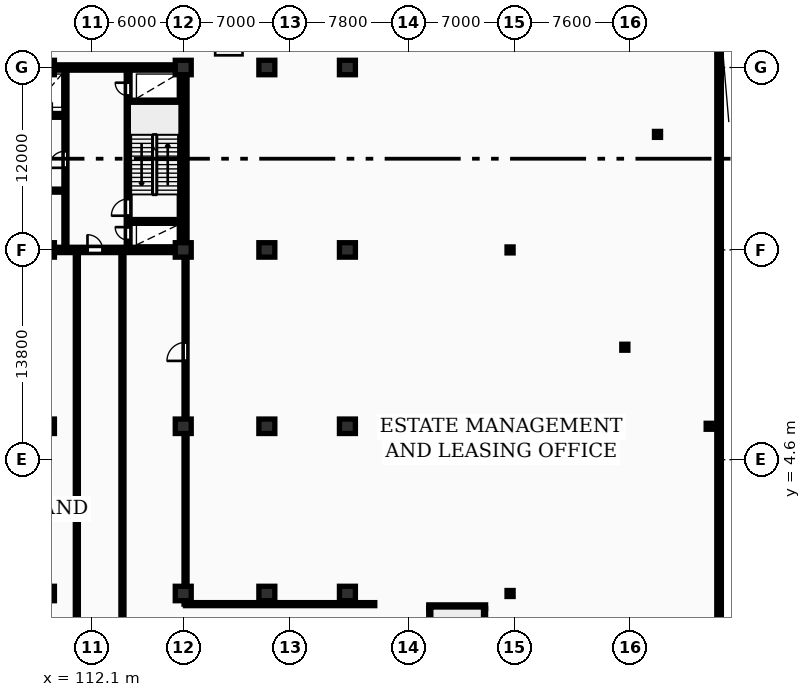
"""IFC4 building model, lengths in metres.
Left out: names, types, materials, properties, quantities, classifications, styles, units other than length and angle.
Written with IfcOpenShell. Run it as: python <this file> out.ifc"""

import sys

from ifc_helpers import new_model, si_unit, direction, frame, frame_2d, origin, origin_2d, place, context, subcontext, project, spatial, rectangle, i_section, extrude, element, fill, save


model = new_model("IFC4")
c1 = context("Model", 3, precision=1e-05, world=origin(), true_north=direction((0.0, 1.0)))
c2 = subcontext(c1, "Body", "Model", "MODEL_VIEW")
j1 = project(units=[si_unit("LENGTHUNIT", "METRE"), si_unit("PLANEANGLEUNIT", "RADIAN")], contexts=[c1])
p1 = place(None, origin())
s1 = spatial("IfcSite", under=j1, at=p1, CompositionType="ELEMENT")
p2 = place(p1, origin())
s2 = spatial("IfcBuilding", under=s1, at=p2, CompositionType="ELEMENT")
p3 = place(p2, origin())
s3 = spatial("IfcBuildingStorey", under=s2, at=p3, CompositionType="ELEMENT", Elevation=0.0)
for number, where, z_axis, x_axis in (
    (1, (109.1, -4.2, 0.0), (0.0, 0.0, 1.0), (1.0, 0.0, 0.0)),
    (2, (109.1, 6.8, 0.0), (0.0, 0.0, 1.0), (1.0, 0.0, 0.0)),
    (3, (109.1, 18.4, 0.0), (0.0, 0.0, 1.0), (1.0, 0.0, 0.0)),
    (4, (109.1, 30.4, 0.0), (0.0, 0.0, 1.0), (1.0, 0.0, 0.0)),
    (5, (118.1, -4.2, 0.0), (0.0, 0.0, 1.0), (1.0, 0.0, 0.0)),
    (6, (118.1, 6.8, 0.0), (0.0, 0.0, 1.0), (1.0, 0.0, 0.0)),
    (7, (118.1, 18.4, 0.0), (0.0, 0.0, 1.0), (1.0, 0.0, 0.0)),
    (8, (118.1, 30.4, 0.0), (0.0, 0.0, 1.0), (1.0, 0.0, 0.0)),
    (9, (123.6, -4.2, 0.0), (0.0, 0.0, 1.0), (1.0, 0.0, 0.0)),
    (10, (123.6, 6.8, 0.0), (0.0, 0.0, 1.0), (1.0, 0.0, 0.0)),
    (11, (123.6, 18.4, 0.0), (0.0, 0.0, 1.0), (1.0, 0.0, 0.0)),
    (12, (123.6, 30.4, 0.0), (0.0, 0.0, 1.0), (1.0, 0.0, 0.0)),
    (13, (128.9, -4.2, 0.0), (0.0, 0.0, 1.0), (1.0, 0.0, 0.0)),
    (14, (128.9, 6.8, 0.0), (0.0, 0.0, 1.0), (1.0, 0.0, 0.0)),
    (15, (128.9, 18.4, 0.0), (0.0, 0.0, 1.0), (1.0, 0.0, 0.0)),
    (16, (128.9, 30.4, 0.0), (0.0, 0.0, 1.0), (1.0, 0.0, 0.0)),
):
    element("IfcColumn", number, at=place(p3, frame(where, z_axis=z_axis, x_axis=x_axis)), inside=s3, PredefinedType="COLUMN", context=c2, shape_type="SweptSolid", body=[
        extrude(rectangle(XDim=1.05, YDim=0.95, at=origin_2d()), origin(), (0.0, 0.0, 1.0), 5.4),
    ])
for number, where, z_axis, x_axis in (
    (17, (139.6, -4.2, 0.0), (0.0, 0.0, 1.0), (1.0, 0.0, 0.0)),
    (18, (139.6, 18.4, 0.0), (0.0, 0.0, 1.0), (1.0, 0.0, 0.0)),
    (19, (149.3, 26.0, 0.0), (0.0, 0.0, 1.0), (1.0, 0.0, 0.0)),
    (20, (147.15, 12.0, 0.0), (0.0, 0.0, 1.0), (1.0, 0.0, 0.0)),
    (21, (152.7, 6.8, 0.0), (0.0, 0.0, 1.0), (1.0, 0.0, 0.0)),
):
    element("IfcColumn", number, at=place(p3, frame(where, z_axis=z_axis, x_axis=x_axis)), inside=s3, PredefinedType="COLUMN", context=c2, shape_type="SweptSolid", body=[
        extrude(i_section(OverallWidth=0.399, OverallDepth=0.394, WebThickness=0.023, FlangeThickness=0.037, FilletRadius=0.015, at=origin_2d()), origin(), (0.0, 0.0, 1.0), 5.4),
    ])
p4 = place(p3, frame((153.35, -26.5, 0.0), z_axis=(0.0, 0.0, 1.0), x_axis=(0.0, 1.0, 0.0)))
e22 = element("IfcWall", 22, at=p4, inside=s3, PredefinedType="STANDARD", context=c2, shape_type="SweptSolid", body=[
    extrude(rectangle(XDim=135.7, YDim=0.3, at=frame_2d((67.85, 0.0))), origin(), (0.0, 0.0, 1.0), 5.1),
])
p5 = place(p4, frame((60.8, 0.0, 0.0)))
e23 = element("IfcOpeningElement", 23, at=p5, cuts=e22, PredefinedType="OPENING", context=c2, shape_type="SweptSolid", body=[
    extrude(rectangle(XDim=7.2, YDim=3.2, at=frame_2d((3.6, 1.6))), frame((0.0, 0.16, 0.0), z_axis=(0.0, -1.0, 0.0), x_axis=(1.0, 0.0, 0.0)), (0.0, 0.0, 1.0), 0.32),
])
p6 = place(p4, frame((70.1, 0.0, 0.0)))
e24 = element("IfcOpeningElement", 24, at=p6, cuts=e22, PredefinedType="OPENING", context=c2, shape_type="SweptSolid", body=[
    extrude(rectangle(XDim=1.8, YDim=2.2, at=frame_2d((0.9, 1.1))), frame((0.0, 0.16, 0.0), z_axis=(0.0, -1.0, 0.0), x_axis=(1.0, 0.0, 0.0)), (0.0, 0.0, 1.0), 0.32),
])
p7 = place(p4, frame((77.5, 0.0, 0.0)))
e25 = element("IfcOpeningElement", 25, at=p7, cuts=e22, PredefinedType="OPENING", context=c2, shape_type="SweptSolid", body=[
    extrude(rectangle(XDim=4.2, YDim=3.6, at=frame_2d((2.1, 1.8))), frame((0.0, 0.16, 0.0), z_axis=(0.0, -1.0, 0.0), x_axis=(1.0, 0.0, 0.0)), (0.0, 0.0, 1.0), 0.32),
])
p8 = place(p4, frame((11.0, 0.0, 0.0)))
e26 = element("IfcOpeningElement", 26, at=p8, cuts=e22, PredefinedType="OPENING", context=c2, shape_type="SweptSolid", body=[
    extrude(rectangle(XDim=1.8, YDim=2.2, at=frame_2d((0.9, 1.1))), frame((0.0, 0.16, 0.0), z_axis=(0.0, -1.0, 0.0), x_axis=(1.0, 0.0, 0.0)), (0.0, 0.0, 1.0), 0.32),
])
p9 = place(p4, frame((105.8, 0.0, 0.0)))
e27 = element("IfcOpeningElement", 27, at=p9, cuts=e22, PredefinedType="OPENING", context=c2, shape_type="SweptSolid", body=[
    extrude(rectangle(XDim=1.8, YDim=2.2, at=frame_2d((0.9, 1.1))), frame((0.0, 0.16, 0.0), z_axis=(0.0, -1.0, 0.0), x_axis=(1.0, 0.0, 0.0)), (0.0, 0.0, 1.0), 0.32),
])
p10 = place(p3, frame((81.925, 30.4, 0.0), z_axis=(0.0, 0.0, 1.0), x_axis=(1.0, 0.0, 0.0)))
e28 = element("IfcWall", 28, at=p10, inside=s3, PredefinedType="SHEAR", context=c2, shape_type="SweptSolid", body=[
    extrude(rectangle(XDim=36.265, YDim=0.35, at=frame_2d((18.132, 0.0))), origin(), (0.0, 0.0, 1.0), 5.4),
])
p11 = place(p3, frame((118.015, 18.575, 0.0), z_axis=(0.0, 0.0, 1.0), x_axis=(0.0, 1.0, 0.0)))
e29 = element("IfcWall", 29, at=p11, inside=s3, PredefinedType="SHEAR", context=c2, shape_type="SweptSolid", body=[
    extrude(rectangle(XDim=11.65, YDim=0.35, at=frame_2d((5.825, 0.0))), origin(), (0.0, 0.0, 1.0), 5.4),
])
p12 = place(p3, frame((81.925, 18.4, 0.0), z_axis=(0.0, 0.0, 1.0), x_axis=(1.0, 0.0, 0.0)))
e30 = element("IfcWall", 30, at=p12, inside=s3, PredefinedType="SHEAR", context=c2, shape_type="SweptSolid", body=[
    extrude(rectangle(XDim=36.265, YDim=0.35, at=frame_2d((18.132, 0.0))), origin(), (0.0, 0.0, 1.0), 5.4),
])
p13 = place(p12, frame((5.675, 0.0, 0.0)))
e31 = element("IfcOpeningElement", 31, at=p13, cuts=e30, PredefinedType="OPENING", context=c2, shape_type="SweptSolid", body=[
    extrude(rectangle(XDim=1.0, YDim=2.15, at=frame_2d((0.5, 1.075))), frame((0.0, 0.185, 0.0), z_axis=(0.0, -1.0, 0.0), x_axis=(1.0, 0.0, 0.0)), (0.0, 0.0, 1.0), 0.37),
])
p14 = place(p12, frame((21.925, 0.0, 0.0)))
e32 = element("IfcOpeningElement", 32, at=p14, cuts=e30, PredefinedType="OPENING", context=c2, shape_type="SweptSolid", body=[
    extrude(rectangle(XDim=1.5, YDim=2.2, at=frame_2d((0.75, 1.1))), frame((0.0, 0.185, 0.0), z_axis=(0.0, -1.0, 0.0), x_axis=(1.0, 0.0, 0.0)), (0.0, 0.0, 1.0), 0.37),
])
p15 = place(p12, frame((29.875, 0.0, 0.0)))
e33 = element("IfcOpeningElement", 33, at=p15, cuts=e30, PredefinedType="OPENING", context=c2, shape_type="SweptSolid", body=[
    extrude(rectangle(XDim=1.0, YDim=2.15, at=frame_2d((0.5, 1.075))), frame((0.0, 0.185, 0.0), z_axis=(0.0, -1.0, 0.0), x_axis=(1.0, 0.0, 0.0)), (0.0, 0.0, 1.0), 0.37),
])
p16 = place(p3, frame((99.68, 27.25, 0.0), z_axis=(0.0, 0.0, 1.0), x_axis=(1.0, 0.0, 0.0)))
e34 = element("IfcWall", 34, at=p16, inside=s3, PredefinedType="SHEAR", context=c2, shape_type="SweptSolid", body=[
    extrude(rectangle(XDim=10.54, YDim=0.25, at=frame_2d((5.27, 0.0))), origin(), (0.0, 0.0, 1.0), 5.4),
])
p17 = place(p16, frame((0.76, 0.0, 0.0)))
e35 = element("IfcOpeningElement", 35, at=p17, cuts=e34, PredefinedType="OPENING", context=c2, shape_type="SweptSolid", body=[
    extrude(rectangle(XDim=1.12, YDim=2.12, at=frame_2d((0.56, 1.06))), frame((0.0, 0.135, 0.0), z_axis=(0.0, -1.0, 0.0), x_axis=(1.0, 0.0, 0.0)), (0.0, 0.0, 1.0), 0.27),
])
p18 = place(p16, frame((3.56, 0.0, 0.0)))
e36 = element("IfcOpeningElement", 36, at=p18, cuts=e34, PredefinedType="OPENING", context=c2, shape_type="SweptSolid", body=[
    extrude(rectangle(XDim=1.12, YDim=2.12, at=frame_2d((0.56, 1.06))), frame((0.0, 0.135, 0.0), z_axis=(0.0, -1.0, 0.0), x_axis=(1.0, 0.0, 0.0)), (0.0, 0.0, 1.0), 0.27),
])
p19 = place(p16, frame((6.36, 0.0, 0.0)))
e37 = element("IfcOpeningElement", 37, at=p19, cuts=e34, PredefinedType="OPENING", context=c2, shape_type="SweptSolid", body=[
    extrude(rectangle(XDim=1.12, YDim=2.12, at=frame_2d((0.56, 1.06))), frame((0.0, 0.135, 0.0), z_axis=(0.0, -1.0, 0.0), x_axis=(1.0, 0.0, 0.0)), (0.0, 0.0, 1.0), 0.27),
])
p20 = place(p16, frame((8.92, 0.0, 0.0)))
e38 = element("IfcOpeningElement", 38, at=p20, cuts=e34, PredefinedType="OPENING", context=c2, shape_type="SweptSolid", body=[
    extrude(rectangle(XDim=0.85, YDim=2.05, at=frame_2d((0.425, 1.025))), frame((0.0, 0.135, 0.0), z_axis=(0.0, -1.0, 0.0), x_axis=(1.0, 0.0, 0.0)), (0.0, 0.0, 1.0), 0.27),
])
p21 = place(p3, frame((91.08, 22.3, 0.0), z_axis=(0.0, 0.0, 1.0), x_axis=(1.0, 0.0, 0.0)))
e39 = element("IfcWall", 39, at=p21, inside=s3, PredefinedType="PARTITIONING", context=c2, shape_type="SweptSolid", body=[
    extrude(rectangle(XDim=19.14, YDim=0.2, at=frame_2d((9.57, 0.0))), origin(), (0.0, 0.0, 1.0), 5.1),
])
p22 = place(p21, frame((1.15, 0.0, 0.0)))
e40 = element("IfcOpeningElement", 40, at=p22, cuts=e39, PredefinedType="OPENING", context=c2, shape_type="SweptSolid", body=[
    extrude(rectangle(XDim=0.85, YDim=2.05, at=frame_2d((0.425, 1.025))), frame((0.0, 0.11, 0.0), z_axis=(0.0, -1.0, 0.0), x_axis=(1.0, 0.0, 0.0)), (0.0, 0.0, 1.0), 0.22),
])
p23 = place(p21, frame((3.2, 0.0, 0.0)))
e41 = element("IfcOpeningElement", 41, at=p23, cuts=e39, PredefinedType="OPENING", context=c2, shape_type="SweptSolid", body=[
    extrude(rectangle(XDim=0.85, YDim=2.05, at=frame_2d((0.425, 1.025))), frame((0.0, 0.11, 0.0), z_axis=(0.0, -1.0, 0.0), x_axis=(1.0, 0.0, 0.0)), (0.0, 0.0, 1.0), 0.22),
])
p24 = place(p21, frame((12.72, 0.0, 0.0)))
e42 = element("IfcOpeningElement", 42, at=p24, cuts=e39, PredefinedType="OPENING", context=c2, shape_type="SweptSolid", body=[
    extrude(rectangle(XDim=1.5, YDim=2.2, at=frame_2d((0.75, 1.1))), frame((0.0, 0.11, 0.0), z_axis=(0.0, -1.0, 0.0), x_axis=(1.0, 0.0, 0.0)), (0.0, 0.0, 1.0), 0.22),
])
p25 = place(p21, frame((5.52, 0.0, 0.0)))
e43 = element("IfcOpeningElement", 43, at=p25, cuts=e39, PredefinedType="OPENING", context=c2, shape_type="SweptSolid", body=[
    extrude(rectangle(XDim=0.88, YDim=2.06, at=frame_2d((0.44, 1.03))), frame((0.0, 0.11, 0.0), z_axis=(0.0, -1.0, 0.0), x_axis=(1.0, 0.0, 0.0)), (0.0, 0.0, 1.0), 0.22),
])
p26 = place(p21, frame((7.67, 0.0, 0.0)))
e44 = element("IfcOpeningElement", 44, at=p26, cuts=e39, PredefinedType="OPENING", context=c2, shape_type="SweptSolid", body=[
    extrude(rectangle(XDim=0.88, YDim=2.06, at=frame_2d((0.44, 1.03))), frame((0.0, 0.11, 0.0), z_axis=(0.0, -1.0, 0.0), x_axis=(1.0, 0.0, 0.0)), (0.0, 0.0, 1.0), 0.22),
])
p27 = place(p21, frame((10.27, 0.0, 0.0)))
e45 = element("IfcOpeningElement", 45, at=p27, cuts=e39, PredefinedType="OPENING", context=c2, shape_type="SweptSolid", body=[
    extrude(rectangle(XDim=0.85, YDim=2.05, at=frame_2d((0.425, 1.025))), frame((0.0, 0.11, 0.0), z_axis=(0.0, -1.0, 0.0), x_axis=(1.0, 0.0, 0.0)), (0.0, 0.0, 1.0), 0.22),
])
p28 = place(p21, frame((15.92, 0.0, 0.0)))
e46 = element("IfcOpeningElement", 46, at=p28, cuts=e39, PredefinedType="OPENING", context=c2, shape_type="SweptSolid", body=[
    extrude(rectangle(XDim=0.96, YDim=2.1, at=frame_2d((0.48, 1.05))), frame((0.0, 0.11, 0.0), z_axis=(0.0, -1.0, 0.0), x_axis=(1.0, 0.0, 0.0)), (0.0, 0.0, 1.0), 0.22),
])
p29 = place(p3, frame((110.35, 18.6, 0.0), z_axis=(0.0, 0.0, 1.0), x_axis=(0.0, 1.0, 0.0)))
e47 = element("IfcWall", 47, at=p29, inside=s3, PredefinedType="PARTITIONING", context=c2, shape_type="SweptSolid", body=[
    extrude(rectangle(XDim=11.6, YDim=0.2, at=frame_2d((5.8, 0.0))), origin(), (0.0, 0.0, 1.0), 5.1),
])
p30 = place(p29, frame((5.2, 0.0, 0.0)))
e48 = element("IfcOpeningElement", 48, at=p30, cuts=e47, PredefinedType="OPENING", context=c2, shape_type="SweptSolid", body=[
    extrude(rectangle(XDim=1.1, YDim=2.15, at=frame_2d((0.55, 1.075))), frame((0.0, 0.11, 0.0), z_axis=(0.0, -1.0, 0.0), x_axis=(1.0, 0.0, 0.0)), (0.0, 0.0, 1.0), 0.22),
])
p31 = place(p3, frame((114.475, 18.6, 0.0), z_axis=(0.0, 0.0, 1.0), x_axis=(0.0, 1.0, 0.0)))
e49 = element("IfcWall", 49, at=p31, inside=s3, PredefinedType="SHEAR", context=c2, shape_type="SweptSolid", body=[
    extrude(rectangle(XDim=11.6, YDim=0.25, at=frame_2d((5.8, 0.0))), origin(), (0.0, 0.0, 1.0), 5.4),
])
p32 = place(p31, frame((0.45, 0.0, 0.0)))
e50 = element("IfcOpeningElement", 50, at=p32, cuts=e49, PredefinedType="OPENING", context=c2, shape_type="SweptSolid", body=[
    extrude(rectangle(XDim=0.85, YDim=2.05, at=frame_2d((0.425, 1.025))), frame((0.0, 0.135, 0.0), z_axis=(0.0, -1.0, 0.0), x_axis=(1.0, 0.0, 0.0)), (0.0, 0.0, 1.0), 0.27),
])
p33 = place(p31, frame((2.05, 0.0, 0.0)))
e51 = element("IfcOpeningElement", 51, at=p33, cuts=e49, PredefinedType="OPENING", context=c2, shape_type="SweptSolid", body=[
    extrude(rectangle(XDim=1.1, YDim=2.1, at=frame_2d((0.55, 1.05))), frame((0.0, 0.135, 0.0), z_axis=(0.0, -1.0, 0.0), x_axis=(1.0, 0.0, 0.0)), (0.0, 0.0, 1.0), 0.27),
])
p34 = place(p31, frame((9.95, 0.0, 0.0)))
e52 = element("IfcOpeningElement", 52, at=p34, cuts=e49, PredefinedType="OPENING", context=c2, shape_type="SweptSolid", body=[
    extrude(rectangle(XDim=0.85, YDim=2.05, at=frame_2d((0.425, 1.025))), frame((0.0, 0.135, 0.0), z_axis=(0.0, -1.0, 0.0), x_axis=(1.0, 0.0, 0.0)), (0.0, 0.0, 1.0), 0.27),
])
for number, where, z_axis, x_axis in (
    (53, (114.6, 20.275, 0.0), (0.0, 0.0, 1.0), (1.0, 0.0, 0.0)),
    (54, (114.6, 28.125, 0.0), (0.0, 0.0, 1.0), (1.0, 0.0, 0.0)),
):
    element("IfcWall", number, at=place(p3, frame(where, z_axis=z_axis, x_axis=x_axis)), inside=s3, PredefinedType="SHEAR", context=c2, shape_type="SweptSolid", body=[
        extrude(rectangle(XDim=3.24, YDim=0.25, at=frame_2d((1.62, 0.0))), origin(), (0.0, 0.0, 1.0), 5.4),
    ])
p35 = place(p3, frame((134.375, -12.8, 0.0), z_axis=(0.0, 0.0, 1.0), x_axis=(0.0, 1.0, 0.0)))
e55 = element("IfcWall", 55, at=p35, inside=s3, PredefinedType="SHEAR", context=c2, shape_type="SweptSolid", body=[
    extrude(rectangle(XDim=7.6, YDim=0.25, at=frame_2d((3.8, 0.0))), origin(), (0.0, 0.0, 1.0), 5.4),
])
p36 = place(p35, frame((0.4, 0.0, 0.0)))
e56 = element("IfcOpeningElement", 56, at=p36, cuts=e55, PredefinedType="OPENING", context=c2, shape_type="SweptSolid", body=[
    extrude(rectangle(XDim=1.1, YDim=2.1, at=frame_2d((0.55, 1.05))), frame((0.0, 0.135, 0.0), z_axis=(0.0, -1.0, 0.0), x_axis=(1.0, 0.0, 0.0)), (0.0, 0.0, 1.0), 0.27),
])
p37 = place(p3, frame((137.865, -12.8, 0.0), z_axis=(0.0, 0.0, 1.0), x_axis=(0.0, 1.0, 0.0)))
e57 = element("IfcWall", 57, at=p37, inside=s3, PredefinedType="SHEAR", context=c2, shape_type="SweptSolid", body=[
    extrude(rectangle(XDim=7.6, YDim=0.25, at=frame_2d((3.8, 0.0))), origin(), (0.0, 0.0, 1.0), 5.4),
])
p38 = place(p3, frame((134.25, -5.075, 0.0), z_axis=(0.0, 0.0, 1.0), x_axis=(1.0, 0.0, 0.0)))
e58 = element("IfcWall", 58, at=p38, inside=s3, PredefinedType="SHEAR", context=c2, shape_type="SweptSolid", body=[
    extrude(rectangle(XDim=3.74, YDim=0.25, at=frame_2d((1.87, 0.0))), origin(), (0.0, 0.0, 1.0), 5.4),
])
p39 = place(p3, frame((111.1, -26.2, 0.0), z_axis=(0.0, 0.0, 1.0), x_axis=(0.0, 1.0, 0.0)))
e59 = element("IfcWall", 59, at=p39, inside=s3, PredefinedType="PARTITIONING", context=c2, shape_type="SweptSolid", body=[
    extrude(rectangle(XDim=44.35, YDim=0.2, at=frame_2d((22.175, 0.0))), origin(), (0.0, 0.0, 1.0), 5.1),
])
p40 = place(p39, frame((16.0, 0.0, 0.0)))
e60 = element("IfcOpeningElement", 60, at=p40, cuts=e59, PredefinedType="OPENING", context=c2, shape_type="SweptSolid", body=[
    extrude(rectangle(XDim=1.1, YDim=2.1, at=frame_2d((0.55, 1.05))), frame((0.0, 0.11, 0.0), z_axis=(0.0, -1.0, 0.0), x_axis=(1.0, 0.0, 0.0)), (0.0, 0.0, 1.0), 0.22),
])
p41 = place(p3, frame((114.1, -26.2, 0.0), z_axis=(0.0, 0.0, 1.0), x_axis=(0.0, 1.0, 0.0)))
e61 = element("IfcWall", 61, at=p41, inside=s3, PredefinedType="PARTITIONING", context=c2, shape_type="SweptSolid", body=[
    extrude(rectangle(XDim=44.35, YDim=0.2, at=frame_2d((22.175, 0.0))), origin(), (0.0, 0.0, 1.0), 5.1),
])
p42 = place(p3, frame((118.25, -4.9, 0.0), z_axis=(0.0, 0.0, 1.0), x_axis=(0.0, 1.0, 0.0)))
e62 = element("IfcWall", 62, at=p42, inside=s3, PredefinedType="PARTITIONING", context=c2, shape_type="SweptSolid", body=[
    extrude(rectangle(XDim=35.35, YDim=0.2, at=frame_2d((17.675, 0.0))), origin(), (0.0, 0.0, 1.0), 4.35),
])
p43 = place(p42, frame((16.0, 0.0, 0.0)))
e63 = element("IfcOpeningElement", 63, at=p43, cuts=e62, PredefinedType="OPENING", context=c2, shape_type="SweptSolid", body=[
    extrude(rectangle(XDim=1.22, YDim=2.18, at=frame_2d((0.61, 1.09))), frame((0.0, 0.11, 0.0), z_axis=(0.0, -1.0, 0.0), x_axis=(1.0, 0.0, 0.0)), (0.0, 0.0, 1.0), 0.22),
])
p44 = place(p3, frame((118.25, -4.9, 0.0), z_axis=(0.0, 0.0, 1.0), x_axis=(1.0, 0.0, 0.0)))
e64 = element("IfcWall", 64, at=p44, inside=s3, PredefinedType="PARTITIONING", context=c2, shape_type="SweptSolid", body=[
    extrude(rectangle(XDim=12.45, YDim=0.2, at=frame_2d((6.225, 0.0))), origin(), (0.0, 0.0, 1.0), 5.1),
])
p45 = place(p15, origin())
e65 = element("IfcDoor", 65, at=p45, inside=s3, OperationType="SINGLE_SWING_LEFT", PredefinedType="DOOR", context=c2, shape_type="SweptSolid", body=[
    extrude(rectangle(XDim=1.0, YDim=2.15, at=frame_2d((0.5, 1.075))), frame((0.0, 0.025, 0.0), z_axis=(0.0, -1.0, 0.0), x_axis=(1.0, 0.0, 0.0)), (0.0, 0.0, 1.0), 0.05),
])
fill(e33, e65)
p46 = place(p30, origin())
e66 = element("IfcDoor", 66, at=p46, inside=s3, OperationType="SINGLE_SWING_LEFT", PredefinedType="DOOR", context=c2, shape_type="SweptSolid", body=[
    extrude(rectangle(XDim=1.1, YDim=2.15, at=frame_2d((0.55, 1.075))), frame((0.0, 0.025, 0.0), z_axis=(0.0, -1.0, 0.0), x_axis=(1.0, 0.0, 0.0)), (0.0, 0.0, 1.0), 0.05),
])
fill(e48, e66)
p47 = place(p32, origin())
e67 = element("IfcDoor", 67, at=p47, inside=s3, OperationType="SINGLE_SWING_RIGHT", PredefinedType="DOOR", context=c2, shape_type="SweptSolid", body=[
    extrude(rectangle(XDim=0.85, YDim=2.05, at=frame_2d((0.425, 1.025))), frame((0.0, 0.025, 0.0), z_axis=(0.0, -1.0, 0.0), x_axis=(1.0, 0.0, 0.0)), (0.0, 0.0, 1.0), 0.05),
])
fill(e50, e67)
p48 = place(p33, origin())
e68 = element("IfcDoor", 68, at=p48, inside=s3, OperationType="SINGLE_SWING_LEFT", PredefinedType="DOOR", context=c2, shape_type="SweptSolid", body=[
    extrude(rectangle(XDim=1.1, YDim=2.1, at=frame_2d((0.55, 1.05))), frame((0.0, 0.025, 0.0), z_axis=(0.0, -1.0, 0.0), x_axis=(1.0, 0.0, 0.0)), (0.0, 0.0, 1.0), 0.05),
])
fill(e51, e68)
p49 = place(p34, origin())
e69 = element("IfcDoor", 69, at=p49, inside=s3, OperationType="SINGLE_SWING_RIGHT", PredefinedType="DOOR", context=c2, shape_type="SweptSolid", body=[
    extrude(rectangle(XDim=0.85, YDim=2.05, at=frame_2d((0.425, 1.025))), frame((0.0, 0.025, 0.0), z_axis=(0.0, -1.0, 0.0), x_axis=(1.0, 0.0, 0.0)), (0.0, 0.0, 1.0), 0.05),
])
fill(e52, e69)
p50 = place(p43, origin())
e70 = element("IfcDoor", 70, at=p50, inside=s3, OperationType="SINGLE_SWING_LEFT", PredefinedType="DOOR", context=c2, shape_type="SweptSolid", body=[
    extrude(rectangle(XDim=1.22, YDim=2.18, at=frame_2d((0.61, 1.09))), frame((0.0, 0.025, 0.0), z_axis=(0.0, -1.0, 0.0), x_axis=(1.0, 0.0, 0.0)), (0.0, 0.0, 1.0), 0.05),
])
fill(e63, e70)
save(model, sys.argv[1])
